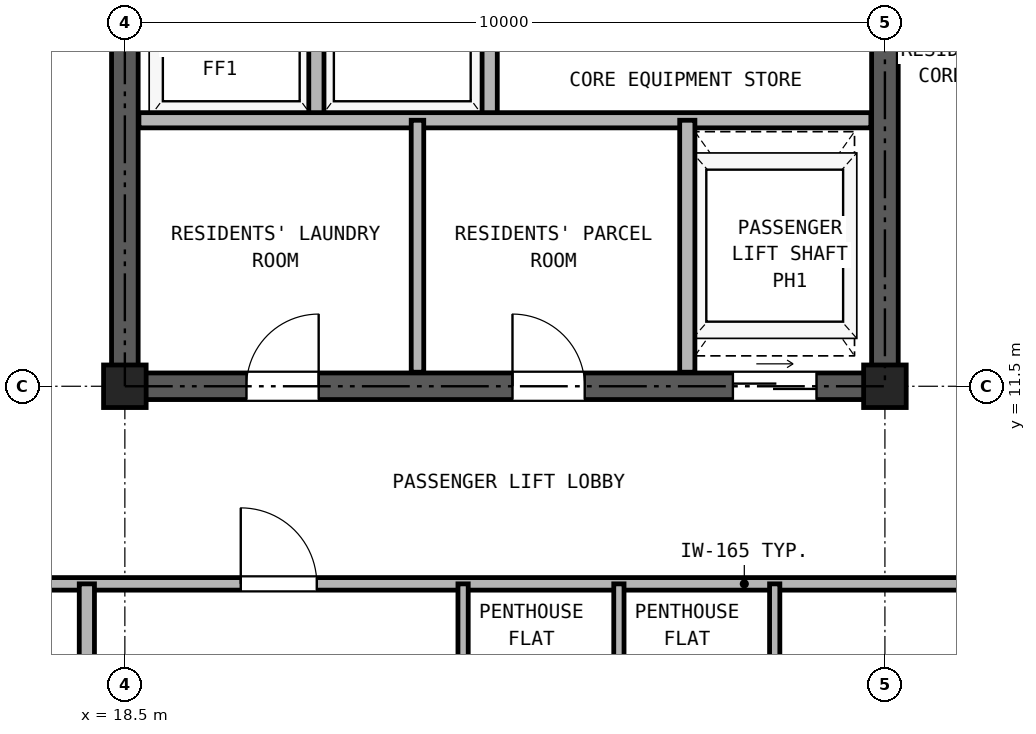
"""IFC4 building model, lengths in metres.
Left out: names, types, materials, properties, quantities, classifications, styles, units other than length and angle.
Written with IfcOpenShell. Run it as: python <this file> out.ifc"""

import sys

from ifc_helpers import new_model, si_unit, direction, frame, frame_2d, origin, origin_2d, place, context, subcontext, project, spatial, rectangle, hollow_rectangle, extrude, source, transform, mapped, element, fill, save


model = new_model("IFC4")
c1 = context("Model", 3, precision=1e-05, world=origin(), true_north=direction((0.0, 1.0)))
c2 = subcontext(c1, "Body", "Model", "MODEL_VIEW")
j1 = project(units=[si_unit("LENGTHUNIT", "METRE"), si_unit("PLANEANGLEUNIT", "RADIAN")], contexts=[c1])
p1 = place(None, origin())
s1 = spatial("IfcSite", under=j1, at=p1, CompositionType="ELEMENT")
p2 = place(p1, origin())
s2 = spatial("IfcBuilding", under=s1, at=p2, CompositionType="ELEMENT")
p3 = place(p2, frame((0.0, 0.0, 220.1)))
s3 = spatial("IfcBuildingStorey", under=s2, at=p3, CompositionType="ELEMENT", Elevation=220.1)
m1 = source(origin(), c2, "Body", "SweptSolid", [
    extrude(hollow_rectangle(XDim=0.56, YDim=0.56, WallThickness=0.03, at=origin_2d()), origin(), (0.0, 0.0, 1.0), 2.98),
])
for number, where, z_axis, x_axis in (
    (1, (18.5, 11.5, 0.0), (0.0, 0.0, 1.0), (1.0, 0.0, 0.0)),
    (2, (28.5, 11.5, 0.0), (0.0, 0.0, 1.0), (1.0, 0.0, 0.0)),
):
    element("IfcColumn", number, at=place(p3, frame(where, z_axis=z_axis, x_axis=x_axis)), inside=s3, PredefinedType="COLUMN", context=c2, shape_type="MappedRepresentation", body=[
        mapped(m1, transform((0.0, 0.0, 0.0), x_axis=(1.0, 0.0, 0.0), y_axis=(0.0, 1.0, 0.0), z_axis=(0.0, 0.0, 1.0), scale=1.0)),
    ])
p4 = place(p3, frame((18.325, 11.5, 0.0), z_axis=(0.0, 0.0, 1.0), x_axis=(1.0, 0.0, 0.0)))
e3 = element("IfcWall", 3, at=p4, inside=s3, PredefinedType="SHEAR", context=c2, shape_type="SweptSolid", body=[
    extrude(rectangle(XDim=10.35, YDim=0.35, at=frame_2d((5.175, 0.0))), origin(), (0.0, 0.0, 1.0), 2.98),
])
p5 = place(p4, frame((1.775, 0.0, 0.0)))
e4 = element("IfcOpeningElement", 4, at=p5, cuts=e3, PredefinedType="OPENING", context=c2, shape_type="SweptSolid", body=[
    extrude(rectangle(XDim=0.95, YDim=2.15, at=frame_2d((0.475, 1.075))), frame((0.0, 0.185, 0.0), z_axis=(0.0, -1.0, 0.0), x_axis=(1.0, 0.0, 0.0)), (0.0, 0.0, 1.0), 0.37),
])
p6 = place(p4, frame((5.275, 0.0, 0.0)))
e5 = element("IfcOpeningElement", 5, at=p6, cuts=e3, PredefinedType="OPENING", context=c2, shape_type="SweptSolid", body=[
    extrude(rectangle(XDim=0.95, YDim=2.15, at=frame_2d((0.475, 1.075))), frame((0.0, 0.185, 0.0), z_axis=(0.0, -1.0, 0.0), x_axis=(1.0, 0.0, 0.0)), (0.0, 0.0, 1.0), 0.37),
])
p7 = place(p4, frame((8.175, 0.0, 0.0)))
e6 = element("IfcOpeningElement", 6, at=p7, cuts=e3, PredefinedType="OPENING", context=c2, shape_type="SweptSolid", body=[
    extrude(rectangle(XDim=1.1, YDim=2.25, at=frame_2d((0.55, 1.125))), frame((0.0, 0.185, 0.0), z_axis=(0.0, -1.0, 0.0), x_axis=(1.0, 0.0, 0.0)), (0.0, 0.0, 1.0), 0.37),
])
p8 = place(p3, frame((18.5, 11.675, 0.0), z_axis=(0.0, 0.0, 1.0), x_axis=(0.0, 1.0, 0.0)))
e7 = element("IfcWall", 7, at=p8, inside=s3, PredefinedType="SHEAR", context=c2, shape_type="SweptSolid", body=[
    extrude(rectangle(XDim=16.9, YDim=0.35, at=frame_2d((8.45, 0.0))), origin(), (0.0, 0.0, 1.0), 2.98),
])
p9 = place(p8, frame((7.475, 0.0, 0.0)))
e8 = element("IfcOpeningElement", 8, at=p9, cuts=e7, PredefinedType="OPENING", context=c2, shape_type="SweptSolid", body=[
    extrude(rectangle(XDim=1.15, YDim=2.2, at=frame_2d((0.575, 1.1))), frame((0.0, 0.185, 0.0), z_axis=(0.0, -1.0, 0.0), x_axis=(1.0, 0.0, 0.0)), (0.0, 0.0, 1.0), 0.37),
])
p10 = place(p3, frame((28.5, 11.675, 0.0), z_axis=(0.0, 0.0, 1.0), x_axis=(0.0, 1.0, 0.0)))
e9 = element("IfcWall", 9, at=p10, inside=s3, PredefinedType="SHEAR", context=c2, shape_type="SweptSolid", body=[
    extrude(rectangle(XDim=16.9, YDim=0.35, at=frame_2d((8.45, 0.0))), origin(), (0.0, 0.0, 1.0), 2.98),
])
p11 = place(p10, frame((7.475, 0.0, 0.0)))
e10 = element("IfcOpeningElement", 10, at=p11, cuts=e9, PredefinedType="OPENING", context=c2, shape_type="SweptSolid", body=[
    extrude(rectangle(XDim=1.15, YDim=2.2, at=frame_2d((0.575, 1.1))), frame((0.0, 0.185, 0.0), z_axis=(0.0, -1.0, 0.0), x_axis=(1.0, 0.0, 0.0)), (0.0, 0.0, 1.0), 0.37),
])
for number, where, z_axis, x_axis in (
    (11, (21.02, 15.0, 0.0), (0.0, 0.0, 1.0), (0.0, 1.0, 0.0)),
    (12, (23.3, 15.0, 0.0), (0.0, 0.0, 1.0), (0.0, 1.0, 0.0)),
):
    element("IfcWall", number, at=place(p3, frame(where, z_axis=z_axis, x_axis=x_axis)), inside=s3, PredefinedType="PARTITIONING", context=c2, shape_type="SweptSolid", body=[
        extrude(rectangle(XDim=3.0, YDim=0.2, at=frame_2d((1.5, 0.0))), origin(), (0.0, 0.0, 1.0), 2.98),
    ])
p12 = place(p3, frame((18.685, 15.0, 0.0), z_axis=(0.0, 0.0, 1.0), x_axis=(1.0, 0.0, 0.0)))
e13 = element("IfcWall", 13, at=p12, inside=s3, PredefinedType="PARTITIONING", context=c2, shape_type="SweptSolid", body=[
    extrude(rectangle(XDim=9.63, YDim=0.2, at=frame_2d((4.815, 0.0))), origin(), (0.0, 0.0, 1.0), 2.98),
])
p13 = place(p3, frame((22.35, 11.685, 0.0), z_axis=(0.0, 0.0, 1.0), x_axis=(0.0, 1.0, 0.0)))
e14 = element("IfcWall", 14, at=p13, inside=s3, PredefinedType="PARTITIONING", context=c2, shape_type="SweptSolid", body=[
    extrude(rectangle(XDim=3.315, YDim=0.165, at=frame_2d((1.657, 0.0))), origin(), (0.0, 0.0, 1.0), 2.98),
])
p14 = place(p3, frame((25.9, 11.685, 0.0), z_axis=(0.0, 0.0, 1.0), x_axis=(0.0, 1.0, 0.0)))
e15 = element("IfcWall", 15, at=p14, inside=s3, PredefinedType="PARTITIONING", context=c2, shape_type="SweptSolid", body=[
    extrude(rectangle(XDim=3.315, YDim=0.2, at=frame_2d((1.657, 0.0))), origin(), (0.0, 0.0, 1.0), 2.98),
])
p15 = place(p3, frame((5.36, 8.9, 0.0), z_axis=(0.0, 0.0, 1.0), x_axis=(1.0, 0.0, 0.0)))
e16 = element("IfcWall", 16, at=p15, inside=s3, PredefinedType="PARTITIONING", context=c2, shape_type="SweptSolid", body=[
    extrude(rectangle(XDim=36.28, YDim=0.165, at=frame_2d((18.14, 0.0))), origin(), (0.0, 0.0, 1.0), 2.98),
])
p16 = place(p15, frame((8.865, 0.0, 0.0)))
e17 = element("IfcOpeningElement", 17, at=p16, cuts=e16, PredefinedType="OPENING", context=c2, shape_type="SweptSolid", body=[
    extrude(rectangle(XDim=1.0, YDim=2.15, at=frame_2d((0.5, 1.075))), frame((0.0, 0.093, 0.0), z_axis=(0.0, -1.0, 0.0), x_axis=(1.0, 0.0, 0.0)), (0.0, 0.0, 1.0), 0.185),
])
p17 = place(p15, frame((14.665, 0.0, 0.0)))
e18 = element("IfcOpeningElement", 18, at=p17, cuts=e16, PredefinedType="OPENING", context=c2, shape_type="SweptSolid", body=[
    extrude(rectangle(XDim=1.0, YDim=2.15, at=frame_2d((0.5, 1.075))), frame((0.0, 0.093, 0.0), z_axis=(0.0, -1.0, 0.0), x_axis=(1.0, 0.0, 0.0)), (0.0, 0.0, 1.0), 0.185),
])
p18 = place(p15, frame((26.915, 0.0, 0.0)))
e19 = element("IfcOpeningElement", 19, at=p18, cuts=e16, PredefinedType="OPENING", context=c2, shape_type="SweptSolid", body=[
    extrude(rectangle(XDim=1.0, YDim=2.15, at=frame_2d((0.5, 1.075))), frame((0.0, 0.093, 0.0), z_axis=(0.0, -1.0, 0.0), x_axis=(1.0, 0.0, 0.0)), (0.0, 0.0, 1.0), 0.185),
])
p19 = place(p3, frame((18.0, 0.16, 0.0), z_axis=(0.0, 0.0, 1.0), x_axis=(0.0, 1.0, 0.0)))
e20 = element("IfcWall", 20, at=p19, inside=s3, PredefinedType="PARTITIONING", context=c2, shape_type="SweptSolid", body=[
    extrude(rectangle(XDim=8.74, YDim=0.2, at=frame_2d((4.37, 0.0))), origin(), (0.0, 0.0, 1.0), 2.98),
])
for number, where, z_axis, x_axis in (
    (21, (22.95, 6.75, 0.0), (0.0, 0.0, 1.0), (0.0, 1.0, 0.0)),
    (22, (25.0, 6.75, 0.0), (0.0, 0.0, 1.0), (0.0, 1.0, 0.0)),
    (23, (27.05, 6.75, 0.0), (0.0, 0.0, 1.0), (0.0, 1.0, 0.0)),
):
    element("IfcWall", number, at=place(p3, frame(where, z_axis=z_axis, x_axis=x_axis)), inside=s3, PredefinedType="PARTITIONING", context=c2, shape_type="SweptSolid", body=[
        extrude(rectangle(XDim=2.15, YDim=0.135, at=frame_2d((1.075, 0.0))), origin(), (0.0, 0.0, 1.0), 2.98),
    ])
p20 = place(p5, frame((0.95, 0.0, 0.0), z_axis=(0.0, 0.0, 1.0), x_axis=(-1.0, 0.0, 0.0)))
e24 = element("IfcDoor", 24, at=p20, inside=s3, OperationType="SINGLE_SWING_RIGHT", PredefinedType="DOOR", context=c2, shape_type="SweptSolid", body=[
    extrude(rectangle(XDim=0.95, YDim=2.15, at=frame_2d((0.475, 1.075))), frame((0.0, 0.025, 0.0), z_axis=(0.0, -1.0, 0.0), x_axis=(1.0, 0.0, 0.0)), (0.0, 0.0, 1.0), 0.05),
])
fill(e4, e24)
p21 = place(p6, frame((0.95, 0.0, 0.0), z_axis=(0.0, 0.0, 1.0), x_axis=(-1.0, 0.0, 0.0)))
e25 = element("IfcDoor", 25, at=p21, inside=s3, OperationType="SINGLE_SWING_LEFT", PredefinedType="DOOR", context=c2, shape_type="SweptSolid", body=[
    extrude(rectangle(XDim=0.95, YDim=2.15, at=frame_2d((0.475, 1.075))), frame((0.0, 0.025, 0.0), z_axis=(0.0, -1.0, 0.0), x_axis=(1.0, 0.0, 0.0)), (0.0, 0.0, 1.0), 0.05),
])
fill(e5, e25)
p22 = place(p7, frame((1.1, 0.0, 0.0), z_axis=(0.0, 0.0, 1.0), x_axis=(-1.0, 0.0, 0.0)))
e26 = element("IfcDoor", 26, at=p22, inside=s3, OperationType="DOUBLE_DOOR_SLIDING", PredefinedType="DOOR", context=c2, shape_type="SweptSolid", body=[
    extrude(rectangle(XDim=1.1, YDim=2.25, at=frame_2d((0.55, 1.125))), frame((0.0, 0.025, 0.0), z_axis=(0.0, -1.0, 0.0), x_axis=(1.0, 0.0, 0.0)), (0.0, 0.0, 1.0), 0.05),
])
fill(e6, e26)
p23 = place(p17, frame((1.0, 0.0, 0.0), z_axis=(0.0, 0.0, 1.0), x_axis=(-1.0, 0.0, 0.0)))
e27 = element("IfcDoor", 27, at=p23, inside=s3, OperationType="SINGLE_SWING_LEFT", PredefinedType="DOOR", context=c2, shape_type="SweptSolid", body=[
    extrude(rectangle(XDim=1.0, YDim=2.15, at=frame_2d((0.5, 1.075))), frame((0.0, 0.025, 0.0), z_axis=(0.0, -1.0, 0.0), x_axis=(1.0, 0.0, 0.0)), (0.0, 0.0, 1.0), 0.05),
])
fill(e18, e27)
save(model, sys.argv[1])
